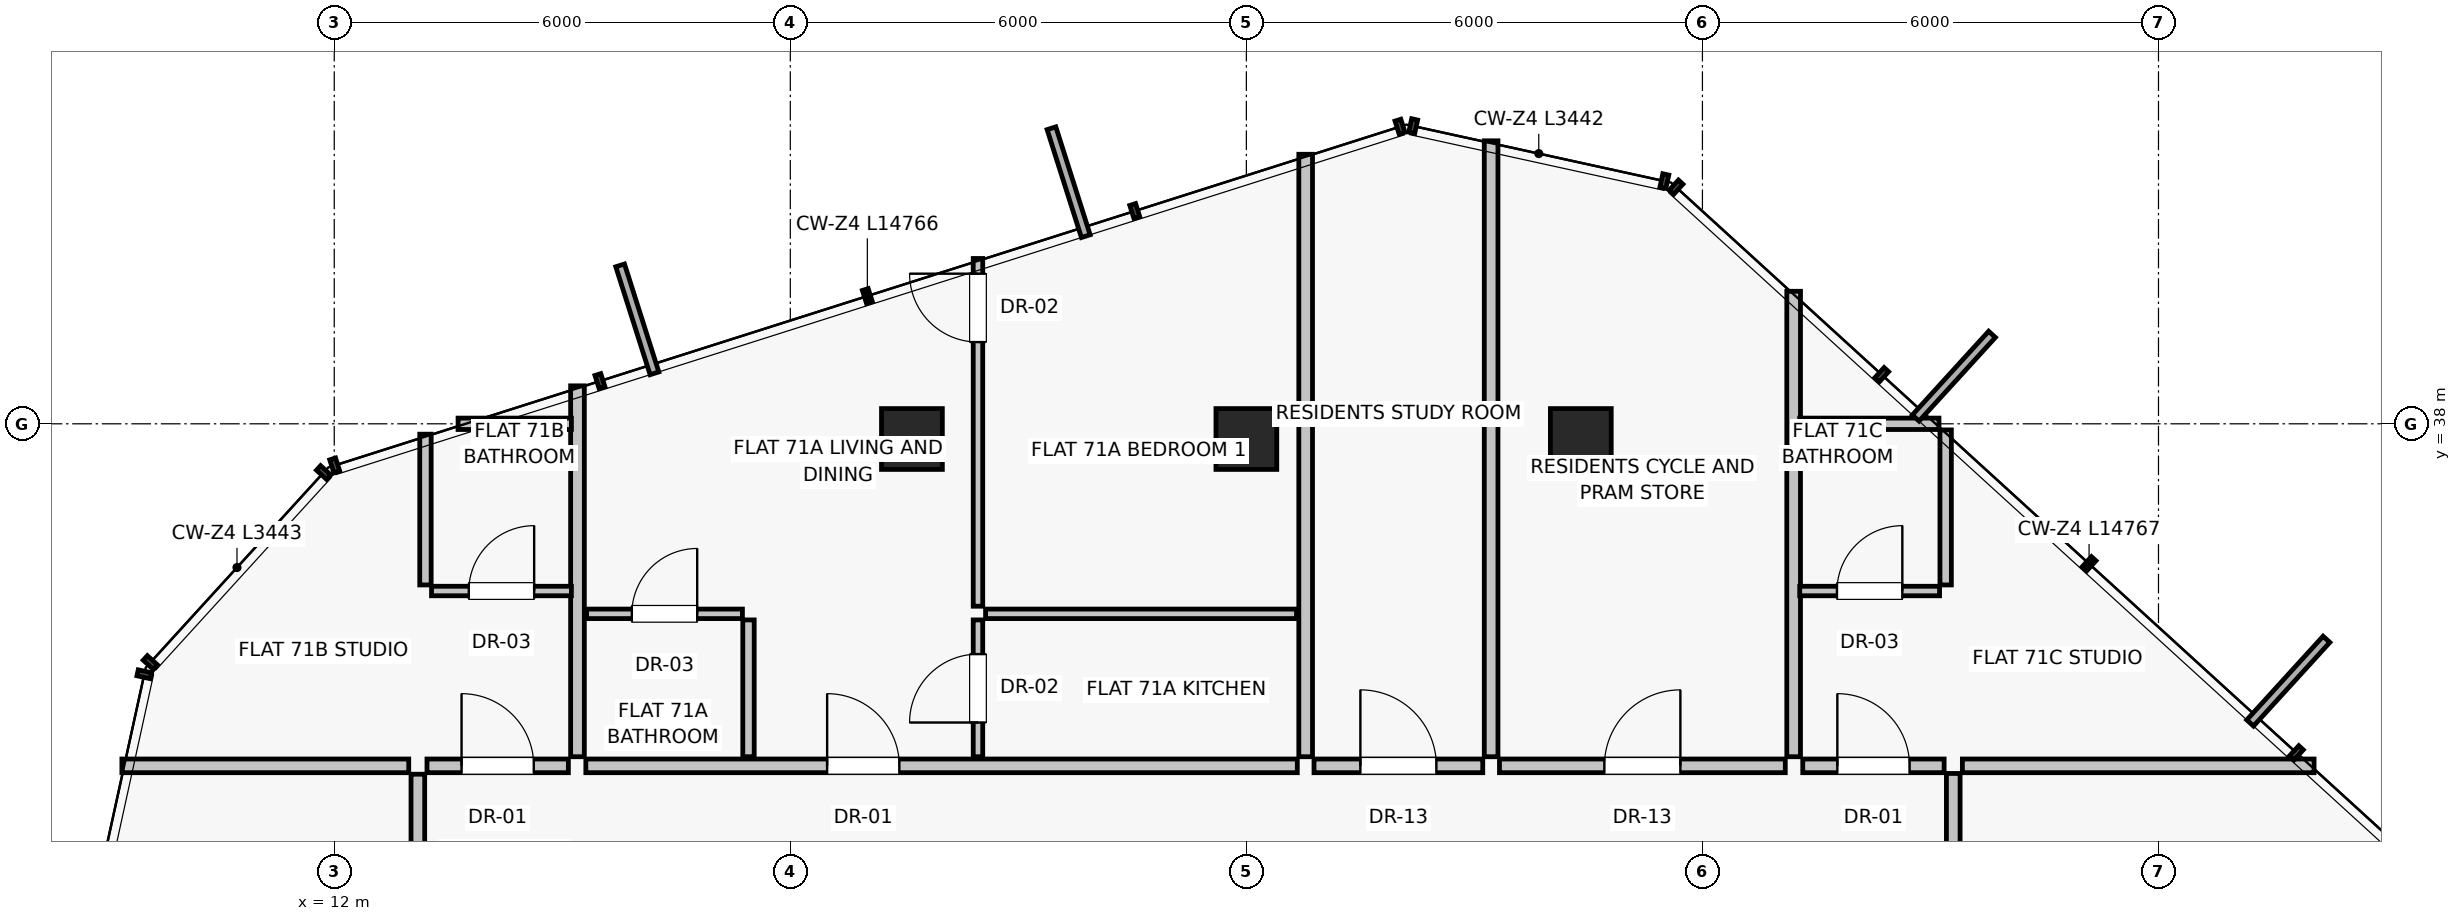
"""IFC4 building model, lengths in metres.
Left out: names, types, materials, properties, quantities, classifications, styles, units other than length and angle.
Written with IfcOpenShell. Run it as: python <this file> out.ifc"""

import sys

from ifc_helpers import new_model, si_unit, direction, frame, frame_2d, origin, origin_2d, place, context, subcontext, project, spatial, rectangle, extrude, source, transform, mapped, element, fill, save


model = new_model("IFC4")
c1 = context("Model", 3, precision=1e-05, world=origin(), true_north=direction((0.0, 1.0)))
c2 = subcontext(c1, "Body", "Model", "MODEL_VIEW")
j1 = project(units=[si_unit("LENGTHUNIT", "METRE"), si_unit("PLANEANGLEUNIT", "RADIAN")], contexts=[c1])
p1 = place(None, origin())
s1 = spatial("IfcSite", under=j1, at=p1, CompositionType="ELEMENT")
p2 = place(p1, origin())
s2 = spatial("IfcBuilding", under=s1, at=p2, CompositionType="ELEMENT")
p3 = place(p2, frame((0.0, 0.0, 251.25)))
s3 = spatial("IfcBuildingStorey", under=s2, at=p3, CompositionType="ELEMENT", Elevation=251.25)
for number, where, z_axis, x_axis in (
    (1, (28.4, 37.8, 0.0), (0.0, 0.0, 1.0), (1.0, 0.0, 0.0)),
    (2, (24.0, 37.8, 0.0), (0.0, 0.0, 1.0), (1.0, 0.0, 0.0)),
    (3, (19.6, 37.8, 0.0), (0.0, 0.0, 1.0), (1.0, 0.0, 0.0)),
):
    element("IfcColumn", number, at=place(p3, frame(where, z_axis=z_axis, x_axis=x_axis)), inside=s3, PredefinedType="COLUMN", context=c2, shape_type="SweptSolid", body=[
        extrude(rectangle(XDim=0.8, YDim=0.8, at=origin_2d()), origin(), (0.0, 0.0, 1.0), 3.25),
    ])
p4 = place(p3, frame((15.2, 33.62, 0.0), z_axis=(0.0, 0.0, 1.0), x_axis=(0.0, 1.0, 0.0)))
e4 = element("IfcWall", 4, at=p4, inside=s3, PredefinedType="PARTITIONING", context=c2, shape_type="SweptSolid", body=[
    extrude(rectangle(XDim=4.879, YDim=0.18, at=frame_2d((2.44, 0.0))), origin(), (0.0, 0.0, 1.0), 3.015),
])
p5 = place(p3, frame((31.2, 33.62, 0.0), z_axis=(0.0, 0.0, 1.0), x_axis=(0.0, 1.0, 0.0)))
e5 = element("IfcWall", 5, at=p5, inside=s3, PredefinedType="PARTITIONING", context=c2, shape_type="SweptSolid", body=[
    extrude(rectangle(XDim=6.123, YDim=0.18, at=frame_2d((3.062, 0.0))), origin(), (0.0, 0.0, 1.0), 3.015),
])
p6 = place(p3, frame((15.31, 33.5, 0.0), z_axis=(0.0, 0.0, 1.0), x_axis=(1.0, 0.0, 0.0)))
e6 = element("IfcWall", 6, at=p6, inside=s3, PredefinedType="PARTITIONING", context=c2, shape_type="SweptSolid", body=[
    extrude(rectangle(XDim=9.36, YDim=0.18, at=frame_2d((4.68, 0.0))), origin(), (0.0, 0.0, 1.0), 3.015),
])
p7 = place(p6, frame((3.175, 0.0, 0.0)))
e7 = element("IfcOpeningElement", 7, at=p7, cuts=e6, PredefinedType="OPENING", context=c2, shape_type="SweptSolid", body=[
    extrude(rectangle(XDim=0.95, YDim=2.02, at=frame_2d((0.475, 1.01))), frame((0.0, 0.1, 0.0), z_axis=(0.0, -1.0, 0.0), x_axis=(1.0, 0.0, 0.0)), (0.0, 0.0, 1.0), 0.2),
])
p8 = place(p3, frame((17.45, 33.62, 0.0), z_axis=(0.0, 0.0, 1.0), x_axis=(0.0, 1.0, 0.0)))
e8 = element("IfcWall", 8, at=p8, inside=s3, PredefinedType="PARTITIONING", context=c2, shape_type="SweptSolid", body=[
    extrude(rectangle(XDim=1.8, YDim=0.15, at=frame_2d((0.9, 0.0))), origin(), (0.0, 0.0, 1.0), 3.015),
])
p9 = place(p3, frame((15.32, 35.5, 0.0), z_axis=(0.0, 0.0, 1.0), x_axis=(1.0, 0.0, 0.0)))
e9 = element("IfcWall", 9, at=p9, inside=s3, PredefinedType="PARTITIONING", context=c2, shape_type="SweptSolid", body=[
    extrude(rectangle(XDim=2.05, YDim=0.125, at=frame_2d((1.025, 0.0))), origin(), (0.0, 0.0, 1.0), 3.015),
])
p10 = place(p9, frame((0.595, 0.0, 0.0)))
e10 = element("IfcOpeningElement", 10, at=p10, cuts=e9, PredefinedType="OPENING", context=c2, shape_type="SweptSolid", body=[
    extrude(rectangle(XDim=0.86, YDim=2.01, at=frame_2d((0.43, 1.005))), frame((0.0, 0.073, 0.0), z_axis=(0.0, -1.0, 0.0), x_axis=(1.0, 0.0, 0.0)), (0.0, 0.0, 1.0), 0.145),
])
p11 = place(p3, frame((20.469, 33.62, 0.0), z_axis=(0.0, 0.0, 1.0), x_axis=(0.0, 1.0, 0.0)))
e11 = element("IfcWall", 11, at=p11, inside=s3, PredefinedType="PARTITIONING", context=c2, shape_type="SweptSolid", body=[
    extrude(rectangle(XDim=1.8, YDim=0.125, at=frame_2d((0.9, 0.0))), origin(), (0.0, 0.0, 1.0), 2.543),
])
p12 = place(p11, frame((0.45, 0.0, 0.0)))
e12 = element("IfcOpeningElement", 12, at=p12, cuts=e11, PredefinedType="OPENING", context=c2, shape_type="SweptSolid", body=[
    extrude(rectangle(XDim=0.9, YDim=2.01, at=frame_2d((0.45, 1.005))), frame((0.0, 0.073, 0.0), z_axis=(0.0, -1.0, 0.0), x_axis=(1.0, 0.0, 0.0)), (0.0, 0.0, 1.0), 0.145),
])
p13 = place(p3, frame((20.569, 35.5, 0.0), z_axis=(0.0, 0.0, 1.0), x_axis=(1.0, 0.0, 0.0)))
e13 = element("IfcWall", 13, at=p13, inside=s3, PredefinedType="PARTITIONING", context=c2, shape_type="SweptSolid", body=[
    extrude(rectangle(XDim=4.091, YDim=0.125, at=frame_2d((2.045, 0.0))), origin(), (0.0, 0.0, 1.0), 3.015),
])
p14 = place(p3, frame((20.469, 35.6, 0.0), z_axis=(0.0, 0.0, 1.0), x_axis=(0.0, 1.0, 0.0)))
e14 = element("IfcWall", 14, at=p14, inside=s3, PredefinedType="PARTITIONING", context=c2, shape_type="SweptSolid", body=[
    extrude(rectangle(XDim=4.575, YDim=0.125, at=frame_2d((2.288, 0.0))), origin(), (0.0, 0.0, 1.0), 2.543),
])
p15 = place(p14, frame((3.475, 0.0, 0.0)))
e15 = element("IfcOpeningElement", 15, at=p15, cuts=e14, PredefinedType="OPENING", context=c2, shape_type="SweptSolid", body=[
    extrude(rectangle(XDim=0.9, YDim=2.01, at=frame_2d((0.45, 1.005))), frame((0.0, 0.073, 0.0), z_axis=(0.0, -1.0, 0.0), x_axis=(1.0, 0.0, 0.0)), (0.0, 0.0, 1.0), 0.145),
])
p16 = place(p3, frame((24.78, 33.62, 0.0), z_axis=(0.0, 0.0, 1.0), x_axis=(0.0, 1.0, 0.0)))
e16 = element("IfcWall", 16, at=p16, inside=s3, PredefinedType="PARTITIONING", context=c2, shape_type="SweptSolid", body=[
    extrude(rectangle(XDim=7.926, YDim=0.18, at=frame_2d((3.963, 0.0))), origin(), (0.0, 0.0, 1.0), 3.015),
])
p17 = place(p3, frame((24.89, 33.5, 0.0), z_axis=(0.0, 0.0, 1.0), x_axis=(1.0, 0.0, 0.0)))
e17 = element("IfcWall", 17, at=p17, inside=s3, PredefinedType="PARTITIONING", context=c2, shape_type="SweptSolid", body=[
    extrude(rectangle(XDim=2.22, YDim=0.18, at=frame_2d((1.11, 0.0))), origin(), (0.0, 0.0, 1.0), 3.015),
])
p18 = place(p17, frame((0.61, 0.0, 0.0)))
e18 = element("IfcOpeningElement", 18, at=p18, cuts=e17, PredefinedType="OPENING", context=c2, shape_type="SweptSolid", body=[
    extrude(rectangle(XDim=1.0, YDim=2.01, at=frame_2d((0.5, 1.005))), frame((0.0, 0.1, 0.0), z_axis=(0.0, -1.0, 0.0), x_axis=(1.0, 0.0, 0.0)), (0.0, 0.0, 1.0), 0.2),
])
p19 = place(p3, frame((27.33, 33.5, 0.0), z_axis=(0.0, 0.0, 1.0), x_axis=(1.0, 0.0, 0.0)))
e19 = element("IfcWall", 19, at=p19, inside=s3, PredefinedType="PARTITIONING", context=c2, shape_type="SweptSolid", body=[
    extrude(rectangle(XDim=3.76, YDim=0.18, at=frame_2d((1.88, 0.0))), origin(), (0.0, 0.0, 1.0), 3.015),
])
p20 = place(p19, frame((1.38, 0.0, 0.0)))
e20 = element("IfcOpeningElement", 20, at=p20, cuts=e19, PredefinedType="OPENING", context=c2, shape_type="SweptSolid", body=[
    extrude(rectangle(XDim=1.0, YDim=2.01, at=frame_2d((0.5, 1.005))), frame((0.0, 0.1, 0.0), z_axis=(0.0, -1.0, 0.0), x_axis=(1.0, 0.0, 0.0)), (0.0, 0.0, 1.0), 0.2),
])
p21 = place(p3, frame((27.22, 33.62, 0.0), z_axis=(0.0, 0.0, 1.0), x_axis=(0.0, 1.0, 0.0)))
e21 = element("IfcWall", 21, at=p21, inside=s3, PredefinedType="PARTITIONING", context=c2, shape_type="SweptSolid", body=[
    extrude(rectangle(XDim=8.103, YDim=0.18, at=frame_2d((4.052, 0.0))), origin(), (0.0, 0.0, 1.0), 3.015),
])
p22 = place(p3, frame((12.98, 33.5, 0.0), z_axis=(0.0, 0.0, 1.0), x_axis=(-1.0, 0.0, 0.0)))
e22 = element("IfcWall", 22, at=p22, inside=s3, PredefinedType="PARTITIONING", context=c2, shape_type="SweptSolid", body=[
    extrude(rectangle(XDim=3.774, YDim=0.18, at=frame_2d((1.887, 0.0))), origin(), (0.0, 0.0, 1.0), 3.015),
])
p23 = place(p3, frame((13.1, 24.11, 0.0), z_axis=(0.0, 0.0, 1.0), x_axis=(0.0, 1.0, 0.0)))
e23 = element("IfcWall", 23, at=p23, inside=s3, PredefinedType="PARTITIONING", context=c2, shape_type="SweptSolid", body=[
    extrude(rectangle(XDim=9.28, YDim=0.18, at=frame_2d((4.64, 0.0))), origin(), (0.0, 0.0, 1.0), 2.662),
])
p24 = place(p23, frame((4.14, 0.0, 0.0)))
e24 = element("IfcOpeningElement", 24, at=p24, cuts=e23, PredefinedType="OPENING", context=c2, shape_type="SweptSolid", body=[
    extrude(rectangle(XDim=1.0, YDim=2.01, at=frame_2d((0.5, 1.005))), frame((0.0, 0.1, 0.0), z_axis=(0.0, -1.0, 0.0), x_axis=(1.0, 0.0, 0.0)), (0.0, 0.0, 1.0), 0.2),
])
p25 = place(p3, frame((33.3, 31.5, 0.0), z_axis=(0.0, 0.0, 1.0), x_axis=(0.0, 1.0, 0.0)))
e25 = element("IfcWall", 25, at=p25, inside=s3, PredefinedType="PARTITIONING", context=c2, shape_type="SweptSolid", body=[
    extrude(rectangle(XDim=1.9, YDim=0.18, at=frame_2d((0.95, 0.0))), origin(), (0.0, 0.0, 1.0), 3.015),
])
p26 = place(p3, frame((13.22, 33.5, 0.0), z_axis=(0.0, 0.0, 1.0), x_axis=(1.0, 0.0, 0.0)))
e26 = element("IfcWall", 26, at=p26, inside=s3, PredefinedType="PARTITIONING", context=c2, shape_type="SweptSolid", body=[
    extrude(rectangle(XDim=1.86, YDim=0.18, at=frame_2d((0.93, 0.0))), origin(), (0.0, 0.0, 1.0), 3.015),
])
p27 = place(p26, frame((0.455, 0.0, 0.0)))
e27 = element("IfcOpeningElement", 27, at=p27, cuts=e26, PredefinedType="OPENING", context=c2, shape_type="SweptSolid", body=[
    extrude(rectangle(XDim=0.95, YDim=2.02, at=frame_2d((0.475, 1.01))), frame((0.0, 0.1, 0.0), z_axis=(0.0, -1.0, 0.0), x_axis=(1.0, 0.0, 0.0)), (0.0, 0.0, 1.0), 0.2),
])
p28 = place(p3, frame((13.28, 35.8, 0.0), z_axis=(0.0, 0.0, 1.0), x_axis=(1.0, 0.0, 0.0)))
e28 = element("IfcWall", 28, at=p28, inside=s3, PredefinedType="PARTITIONING", context=c2, shape_type="SweptSolid", body=[
    extrude(rectangle(XDim=1.84, YDim=0.125, at=frame_2d((0.92, 0.0))), origin(), (0.0, 0.0, 1.0), 3.015),
])
p29 = place(p28, frame((0.49, 0.0, 0.0)))
e29 = element("IfcOpeningElement", 29, at=p29, cuts=e28, PredefinedType="OPENING", context=c2, shape_type="SweptSolid", body=[
    extrude(rectangle(XDim=0.86, YDim=2.01, at=frame_2d((0.43, 1.005))), frame((0.0, 0.073, 0.0), z_axis=(0.0, -1.0, 0.0), x_axis=(1.0, 0.0, 0.0)), (0.0, 0.0, 1.0), 0.145),
])
p30 = place(p3, frame((13.629, 38.0, 0.0), z_axis=(0.0, 0.0, 1.0), x_axis=(1.0, 0.0, 0.0)))
e30 = element("IfcWall", 30, at=p30, inside=s3, PredefinedType="PARTITIONING", context=c2, shape_type="SweptSolid", body=[
    extrude(rectangle(XDim=1.491, YDim=0.15, at=frame_2d((0.746, 0.0))), origin(), (0.0, 0.0, 1.0), 3.015),
])
p31 = place(p3, frame((13.2, 35.88, 0.0), z_axis=(0.0, 0.0, 1.0), x_axis=(0.0, 1.0, 0.0)))
e31 = element("IfcWall", 31, at=p31, inside=s3, PredefinedType="PARTITIONING", context=c2, shape_type="SweptSolid", body=[
    extrude(rectangle(XDim=1.984, YDim=0.15, at=frame_2d((0.992, 0.0))), origin(), (0.0, 0.0, 1.0), 3.015),
])
p32 = place(p3, frame((33.42, 33.5, 0.0), z_axis=(0.0, 0.0, 1.0), x_axis=(1.0, 0.0, 0.0)))
e32 = element("IfcWall", 32, at=p32, inside=s3, PredefinedType="PARTITIONING", context=c2, shape_type="SweptSolid", body=[
    extrude(rectangle(XDim=4.627, YDim=0.18, at=frame_2d((2.313, 0.0))), origin(), (0.0, 0.0, 1.0), 3.015),
])
p33 = place(p3, frame((31.32, 33.5, 0.0), z_axis=(0.0, 0.0, 1.0), x_axis=(1.0, 0.0, 0.0)))
e33 = element("IfcWall", 33, at=p33, inside=s3, PredefinedType="PARTITIONING", context=c2, shape_type="SweptSolid", body=[
    extrude(rectangle(XDim=1.86, YDim=0.18, at=frame_2d((0.93, 0.0))), origin(), (0.0, 0.0, 1.0), 3.015),
])
p34 = place(p33, frame((0.455, 0.0, 0.0)))
e34 = element("IfcOpeningElement", 34, at=p34, cuts=e33, PredefinedType="OPENING", context=c2, shape_type="SweptSolid", body=[
    extrude(rectangle(XDim=0.95, YDim=2.02, at=frame_2d((0.475, 1.01))), frame((0.0, 0.1, 0.0), z_axis=(0.0, -1.0, 0.0), x_axis=(1.0, 0.0, 0.0)), (0.0, 0.0, 1.0), 0.2),
])
p35 = place(p3, frame((31.28, 35.8, 0.0), z_axis=(0.0, 0.0, 1.0), x_axis=(1.0, 0.0, 0.0)))
e35 = element("IfcWall", 35, at=p35, inside=s3, PredefinedType="PARTITIONING", context=c2, shape_type="SweptSolid", body=[
    extrude(rectangle(XDim=1.84, YDim=0.125, at=frame_2d((0.92, 0.0))), origin(), (0.0, 0.0, 1.0), 3.015),
])
p36 = place(p35, frame((0.49, 0.0, 0.0)))
e36 = element("IfcOpeningElement", 36, at=p36, cuts=e35, PredefinedType="OPENING", context=c2, shape_type="SweptSolid", body=[
    extrude(rectangle(XDim=0.86, YDim=2.01, at=frame_2d((0.43, 1.005))), frame((0.0, 0.073, 0.0), z_axis=(0.0, -1.0, 0.0), x_axis=(1.0, 0.0, 0.0)), (0.0, 0.0, 1.0), 0.145),
])
p37 = place(p3, frame((31.28, 38.0, 0.0), z_axis=(0.0, 0.0, 1.0), x_axis=(1.0, 0.0, 0.0)))
e37 = element("IfcWall", 37, at=p37, inside=s3, PredefinedType="PARTITIONING", context=c2, shape_type="SweptSolid", body=[
    extrude(rectangle(XDim=1.832, YDim=0.15, at=frame_2d((0.916, 0.0))), origin(), (0.0, 0.0, 1.0), 3.015),
])
p38 = place(p3, frame((33.2, 35.88, 0.0), z_axis=(0.0, 0.0, 1.0), x_axis=(0.0, 1.0, 0.0)))
e38 = element("IfcWall", 38, at=p38, inside=s3, PredefinedType="PARTITIONING", context=c2, shape_type="SweptSolid", body=[
    extrude(rectangle(XDim=2.04, YDim=0.15, at=frame_2d((1.02, 0.0))), origin(), (0.0, 0.0, 1.0), 3.015),
])
m1 = source(origin(), c2, "Body", "SweptSolid", [
    extrude(rectangle(XDim=0.95, YDim=2.02, at=frame_2d((0.475, 1.01))), frame((0.0, 0.025, 0.0), z_axis=(0.0, -1.0, 0.0), x_axis=(1.0, 0.0, 0.0)), (0.0, 0.0, 1.0), 0.05),
])
p39 = place(p7, origin())
e39 = element("IfcDoor", 39, at=p39, inside=s3, OperationType="SINGLE_SWING_LEFT", PredefinedType="DOOR", context=c2, shape_type="MappedRepresentation", body=[
    mapped(m1, transform((0.0, 0.0, 0.0), scale=1.0)),
])
fill(e7, e39)
m2 = source(origin(), c2, "Body", "SweptSolid", [
    extrude(rectangle(XDim=0.86, YDim=2.01, at=frame_2d((0.43, 1.005))), frame((0.0, 0.025, 0.0), z_axis=(0.0, -1.0, 0.0), x_axis=(1.0, 0.0, 0.0)), (0.0, 0.0, 1.0), 0.05),
])
p40 = place(p10, origin())
e40 = element("IfcDoor", 40, at=p40, inside=s3, OperationType="SINGLE_SWING_RIGHT", PredefinedType="DOOR", context=c2, shape_type="MappedRepresentation", body=[
    mapped(m2, transform((0.0, 0.0, 0.0), scale=1.0)),
])
fill(e10, e40)
m3 = source(origin(), c2, "Body", "SweptSolid", [
    extrude(rectangle(XDim=0.9, YDim=2.01, at=frame_2d((0.45, 1.005))), frame((0.0, 0.025, 0.0), z_axis=(0.0, -1.0, 0.0), x_axis=(1.0, 0.0, 0.0)), (0.0, 0.0, 1.0), 0.05),
])
p41 = place(p12, origin())
e41 = element("IfcDoor", 41, at=p41, inside=s3, OperationType="SINGLE_SWING_LEFT", PredefinedType="DOOR", context=c2, shape_type="MappedRepresentation", body=[
    mapped(m3, transform((0.0, 0.0, 0.0), scale=1.0)),
])
fill(e12, e41)
p42 = place(p15, origin())
e42 = element("IfcDoor", 42, at=p42, inside=s3, OperationType="SINGLE_SWING_RIGHT", PredefinedType="DOOR", context=c2, shape_type="MappedRepresentation", body=[
    mapped(m3, transform((0.0, 0.0, 0.0), scale=1.0)),
])
fill(e15, e42)
m4 = source(origin(), c2, "Body", "SweptSolid", [
    extrude(rectangle(XDim=1.0, YDim=2.01, at=frame_2d((0.5, 1.005))), frame((0.0, 0.025, 0.0), z_axis=(0.0, -1.0, 0.0), x_axis=(1.0, 0.0, 0.0)), (0.0, 0.0, 1.0), 0.05),
])
p43 = place(p18, origin())
e43 = element("IfcDoor", 43, at=p43, inside=s3, OperationType="SINGLE_SWING_LEFT", PredefinedType="DOOR", context=c2, shape_type="MappedRepresentation", body=[
    mapped(m4, transform((0.0, 0.0, 0.0), scale=1.0)),
])
fill(e18, e43)
p44 = place(p20, origin())
e44 = element("IfcDoor", 44, at=p44, inside=s3, OperationType="SINGLE_SWING_RIGHT", PredefinedType="DOOR", context=c2, shape_type="MappedRepresentation", body=[
    mapped(m4, transform((0.0, 0.0, 0.0), scale=1.0)),
])
fill(e20, e44)
p45 = place(p27, origin())
e45 = element("IfcDoor", 45, at=p45, inside=s3, OperationType="SINGLE_SWING_LEFT", PredefinedType="DOOR", context=c2, shape_type="MappedRepresentation", body=[
    mapped(m1, transform((0.0, 0.0, 0.0), scale=1.0)),
])
fill(e27, e45)
p46 = place(p29, origin())
e46 = element("IfcDoor", 46, at=p46, inside=s3, OperationType="SINGLE_SWING_RIGHT", PredefinedType="DOOR", context=c2, shape_type="MappedRepresentation", body=[
    mapped(m2, transform((0.0, 0.0, 0.0), scale=1.0)),
])
fill(e29, e46)
p47 = place(p34, origin())
e47 = element("IfcDoor", 47, at=p47, inside=s3, OperationType="SINGLE_SWING_LEFT", PredefinedType="DOOR", context=c2, shape_type="MappedRepresentation", body=[
    mapped(m1, transform((0.0, 0.0, 0.0), scale=1.0)),
])
fill(e34, e47)
p48 = place(p36, origin())
e48 = element("IfcDoor", 48, at=p48, inside=s3, OperationType="SINGLE_SWING_RIGHT", PredefinedType="DOOR", context=c2, shape_type="MappedRepresentation", body=[
    mapped(m2, transform((0.0, 0.0, 0.0), scale=1.0)),
])
fill(e36, e48)
save(model, sys.argv[1])
